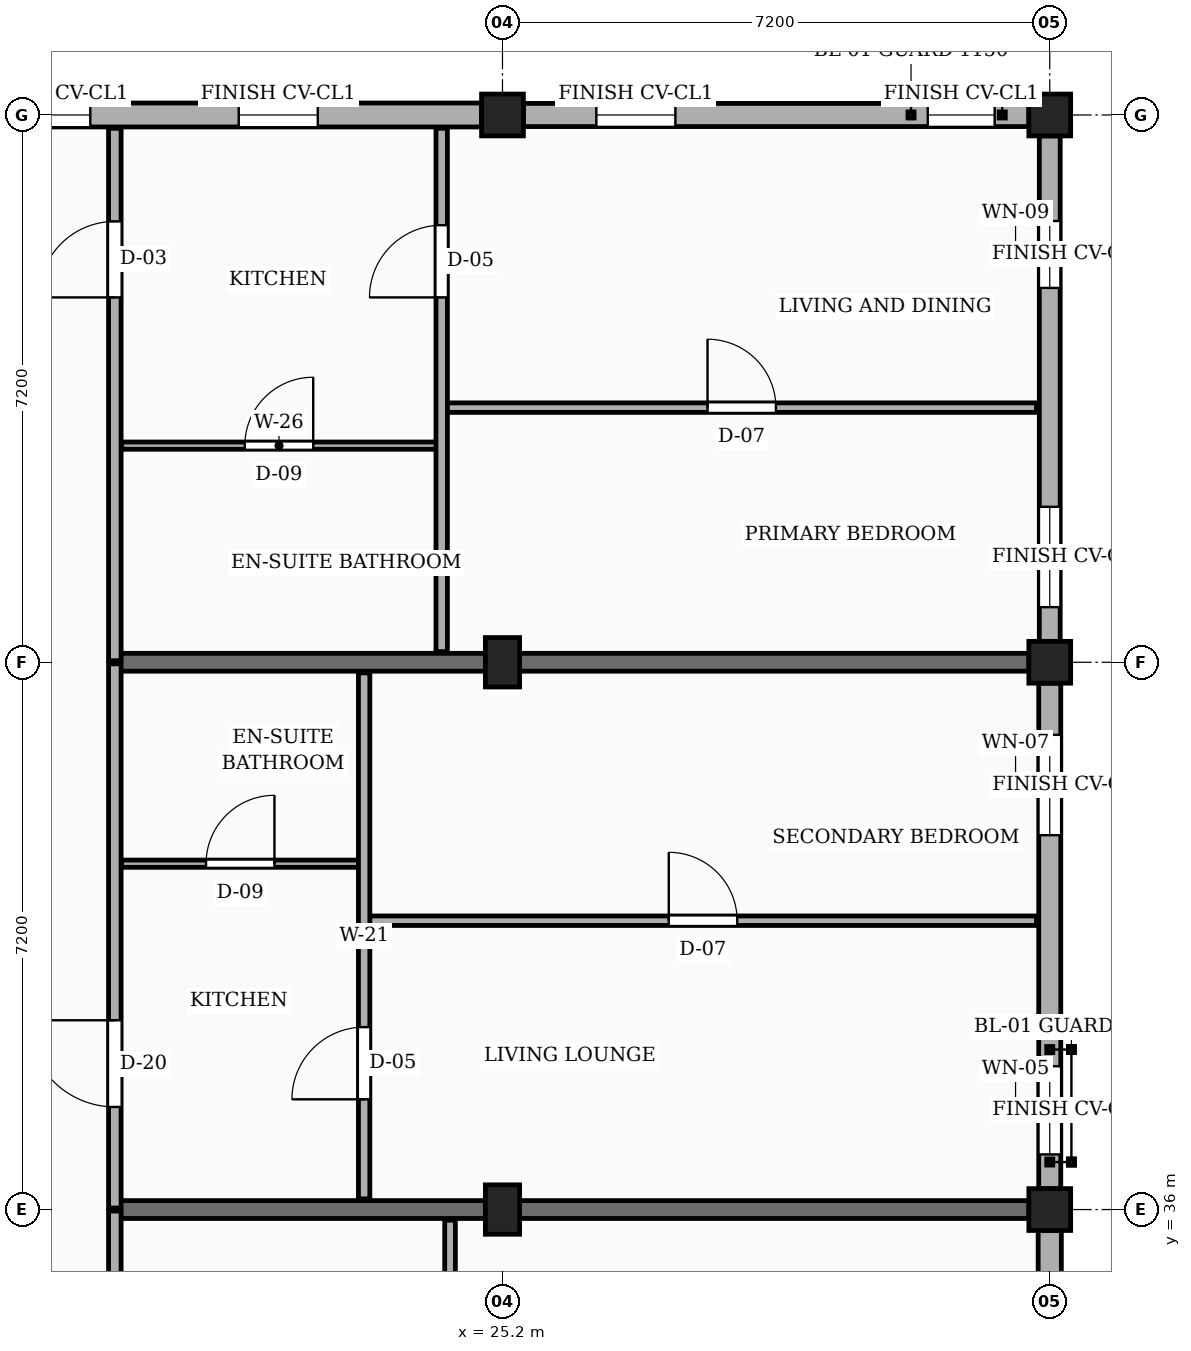
"""IFC4 building model, lengths in metres.
Left out: names, types, materials, properties, quantities, classifications, styles, units other than length and angle.
Written with IfcOpenShell. Run it as: python <this file> out.ifc"""

import sys

from ifc_helpers import new_model, si_unit, direction, frame, frame_2d, origin, origin_2d, place, context, subcontext, project, spatial, rectangle, extrude, element, fill, save


model = new_model("IFC4")
c1 = context("Model", 3, precision=1e-05, world=origin(), true_north=direction((0.0, 1.0)))
c2 = subcontext(c1, "Body", "Model", "MODEL_VIEW")
j1 = project(units=[si_unit("LENGTHUNIT", "METRE"), si_unit("PLANEANGLEUNIT", "RADIAN")], contexts=[c1])
p1 = place(None, origin())
s1 = spatial("IfcSite", under=j1, at=p1, CompositionType="ELEMENT")
p2 = place(p1, origin())
s2 = spatial("IfcBuilding", under=s1, at=p2, CompositionType="ELEMENT")
p3 = place(p2, frame((0.0, 0.0, 20.25)))
s3 = spatial("IfcBuildingStorey", under=s2, at=p3, CompositionType="ELEMENT", Elevation=20.25)
for number, where, z_axis, x_axis in (
    (1, (25.2, 36.0, 0.0), (0.0, 0.0, 1.0), (1.0, 0.0, 0.0)),
    (2, (25.2, 43.2, 0.0), (0.0, 0.0, 1.0), (1.0, 0.0, 0.0)),
):
    element("IfcColumn", number, at=place(p3, frame(where, z_axis=z_axis, x_axis=x_axis)), inside=s3, PredefinedType="COLUMN", context=c2, shape_type="SweptSolid", body=[
        extrude(rectangle(XDim=0.45, YDim=0.65, at=origin_2d()), origin(), (0.0, 0.0, 1.0), 3.15),
    ])
for number, where, z_axis, x_axis in (
    (3, (25.2, 50.4, 0.0), (0.0, 0.0, 1.0), (1.0, 0.0, 0.0)),
    (4, (32.4, 36.0, 0.0), (0.0, 0.0, 1.0), (1.0, 0.0, 0.0)),
    (5, (32.4, 43.2, 0.0), (0.0, 0.0, 1.0), (1.0, 0.0, 0.0)),
    (6, (32.4, 50.4, 0.0), (0.0, 0.0, 1.0), (1.0, 0.0, 0.0)),
):
    element("IfcColumn", number, at=place(p3, frame(where, z_axis=z_axis, x_axis=x_axis)), inside=s3, PredefinedType="COLUMN", context=c2, shape_type="SweptSolid", body=[
        extrude(rectangle(XDim=0.55, YDim=0.55, at=origin_2d()), origin(), (0.0, 0.0, 1.0), 3.15),
    ])
for number, where, z_axis, x_axis in (
    (7, (20.1, 36.0, 0.0), (0.0, 0.0, 1.0), (1.0, 0.0, 0.0)),
    (8, (20.1, 43.2, 0.0), (0.0, 0.0, 1.0), (1.0, 0.0, 0.0)),
):
    element("IfcWall", number, at=place(p3, frame(where, z_axis=z_axis, x_axis=x_axis)), inside=s3, PredefinedType="SOLIDWALL", context=c2, shape_type="SweptSolid", body=[
        extrude(rectangle(XDim=12.025, YDim=0.235, at=frame_2d((6.012, 0.0))), origin(), (0.0, 0.0, 1.0), 2.17),
    ])
p4 = place(p3, frame((32.4, 29.075, 0.0), z_axis=(0.0, 0.0, 1.0), x_axis=(0.0, 1.0, 0.0)))
e9 = element("IfcWall", 9, at=p4, inside=s3, PredefinedType="SOLIDWALL", context=c2, shape_type="SweptSolid", body=[
    extrude(rectangle(XDim=6.65, YDim=0.305, at=frame_2d((3.325, 0.0))), origin(), (0.0, 0.0, 1.0), 2.44),
])
p5 = place(p4, frame((0.45, 0.0, 0.78)))
e10 = element("IfcOpeningElement", 10, at=p5, cuts=e9, PredefinedType="OPENING", context=c2, shape_type="SweptSolid", body=[
    extrude(rectangle(XDim=1.0, YDim=1.15, at=frame_2d((0.5, 0.575))), frame((0.0, 0.163, 0.0), z_axis=(0.0, -1.0, 0.0), x_axis=(1.0, 0.0, 0.0)), (0.0, 0.0, 1.0), 0.325),
])
p6 = place(p4, frame((4.65, 0.0, 0.78)))
e11 = element("IfcOpeningElement", 11, at=p6, cuts=e9, PredefinedType="OPENING", context=c2, shape_type="SweptSolid", body=[
    extrude(rectangle(XDim=1.16, YDim=1.15, at=frame_2d((0.58, 0.575))), frame((0.0, 0.163, 0.0), z_axis=(0.0, -1.0, 0.0), x_axis=(1.0, 0.0, 0.0)), (0.0, 0.0, 1.0), 0.325),
])
p7 = place(p3, frame((32.4, 36.275, 0.0), z_axis=(0.0, 0.0, 1.0), x_axis=(0.0, 1.0, 0.0)))
e12 = element("IfcWall", 12, at=p7, inside=s3, PredefinedType="SOLIDWALL", context=c2, shape_type="SweptSolid", body=[
    extrude(rectangle(XDim=6.65, YDim=0.29, at=frame_2d((3.325, 0.0))), origin(), (0.0, 0.0, 1.0), 2.44),
])
p8 = place(p7, frame((0.45, 0.0, 0.78)))
e13 = element("IfcOpeningElement", 13, at=p8, cuts=e12, PredefinedType="OPENING", context=c2, shape_type="SweptSolid", body=[
    extrude(rectangle(XDim=1.16, YDim=1.15, at=frame_2d((0.58, 0.575))), frame((0.0, 0.155, 0.0), z_axis=(0.0, -1.0, 0.0), x_axis=(1.0, 0.0, 0.0)), (0.0, 0.0, 1.0), 0.31),
])
p9 = place(p7, frame((4.65, 0.0, 0.78)))
e14 = element("IfcOpeningElement", 14, at=p9, cuts=e12, PredefinedType="OPENING", context=c2, shape_type="SweptSolid", body=[
    extrude(rectangle(XDim=1.32, YDim=1.15, at=frame_2d((0.66, 0.575))), frame((0.0, 0.155, 0.0), z_axis=(0.0, -1.0, 0.0), x_axis=(1.0, 0.0, 0.0)), (0.0, 0.0, 1.0), 0.31),
])
p10 = place(p3, frame((32.4, 43.475, 0.0), z_axis=(0.0, 0.0, 1.0), x_axis=(0.0, 1.0, 0.0)))
e15 = element("IfcWall", 15, at=p10, inside=s3, PredefinedType="SOLIDWALL", context=c2, shape_type="SweptSolid", body=[
    extrude(rectangle(XDim=6.65, YDim=0.275, at=frame_2d((3.325, 0.0))), origin(), (0.0, 0.0, 1.0), 2.44),
])
p11 = place(p10, frame((0.45, 0.0, 0.78)))
e16 = element("IfcOpeningElement", 16, at=p11, cuts=e15, PredefinedType="OPENING", context=c2, shape_type="SweptSolid", body=[
    extrude(rectangle(XDim=1.32, YDim=1.15, at=frame_2d((0.66, 0.575))), frame((0.0, 0.147, 0.0), z_axis=(0.0, -1.0, 0.0), x_axis=(1.0, 0.0, 0.0)), (0.0, 0.0, 1.0), 0.295),
])
p12 = place(p10, frame((4.65, 0.0, 0.78)))
e17 = element("IfcOpeningElement", 17, at=p12, cuts=e15, PredefinedType="OPENING", context=c2, shape_type="SweptSolid", body=[
    extrude(rectangle(XDim=0.88, YDim=1.26, at=frame_2d((0.44, 0.63))), frame((0.0, 0.147, 0.0), z_axis=(0.0, -1.0, 0.0), x_axis=(1.0, 0.0, 0.0)), (0.0, 0.0, 1.0), 0.295),
])
p13 = place(p3, frame((32.125, 50.4, 0.0), z_axis=(0.0, 0.0, 1.0), x_axis=(-1.0, 0.0, 0.0)))
e18 = element("IfcWall", 18, at=p13, inside=s3, PredefinedType="SOLIDWALL", context=c2, shape_type="SweptSolid", body=[
    extrude(rectangle(XDim=6.65, YDim=0.305, at=frame_2d((3.325, 0.0))), origin(), (0.0, 0.0, 1.0), 2.44),
])
p14 = place(p13, frame((0.45, 0.0, 0.78)))
e19 = element("IfcOpeningElement", 19, at=p14, cuts=e18, PredefinedType="OPENING", context=c2, shape_type="SweptSolid", body=[
    extrude(rectangle(XDim=0.88, YDim=1.26, at=frame_2d((0.44, 0.63))), frame((0.0, 0.163, 0.0), z_axis=(0.0, -1.0, 0.0), x_axis=(1.0, 0.0, 0.0)), (0.0, 0.0, 1.0), 0.325),
])
p15 = place(p13, frame((4.65, 0.0, 0.78)))
e20 = element("IfcOpeningElement", 20, at=p15, cuts=e18, PredefinedType="OPENING", context=c2, shape_type="SweptSolid", body=[
    extrude(rectangle(XDim=1.04, YDim=1.26, at=frame_2d((0.52, 0.63))), frame((0.0, 0.163, 0.0), z_axis=(0.0, -1.0, 0.0), x_axis=(1.0, 0.0, 0.0)), (0.0, 0.0, 1.0), 0.325),
])
p16 = place(p3, frame((24.925, 50.4, 0.0), z_axis=(0.0, 0.0, 1.0), x_axis=(-1.0, 0.0, 0.0)))
e21 = element("IfcWall", 21, at=p16, inside=s3, PredefinedType="SOLIDWALL", context=c2, shape_type="SweptSolid", body=[
    extrude(rectangle(XDim=6.65, YDim=0.315, at=frame_2d((3.325, 0.0))), origin(), (0.0, 0.0, 1.0), 2.44),
])
p17 = place(p16, frame((2.155, 0.0, 0.78)))
e22 = element("IfcOpeningElement", 22, at=p17, cuts=e21, PredefinedType="OPENING", context=c2, shape_type="SweptSolid", body=[
    extrude(rectangle(XDim=1.04, YDim=1.26, at=frame_2d((0.52, 0.63))), frame((0.0, 0.167, 0.0), z_axis=(0.0, -1.0, 0.0), x_axis=(1.0, 0.0, 0.0)), (0.0, 0.0, 1.0), 0.335),
])
p18 = place(p16, frame((5.147, 0.0, 0.78)))
e23 = element("IfcOpeningElement", 23, at=p18, cuts=e21, PredefinedType="OPENING", context=c2, shape_type="SweptSolid", body=[
    extrude(rectangle(XDim=1.04, YDim=1.26, at=frame_2d((0.52, 0.63))), frame((0.0, 0.167, 0.0), z_axis=(0.0, -1.0, 0.0), x_axis=(1.0, 0.0, 0.0)), (0.0, 0.0, 1.0), 0.335),
])
p19 = place(p3, frame((20.1, 28.82, 0.0), z_axis=(0.0, 0.0, 1.0), x_axis=(0.0, 1.0, 0.0)))
e24 = element("IfcWall", 24, at=p19, inside=s3, PredefinedType="PARTITIONING", context=c2, shape_type="SweptSolid", body=[
    extrude(rectangle(XDim=7.16, YDim=0.165, at=frame_2d((3.58, 0.0))), origin(), (0.0, 0.0, 1.0), 2.305),
])
p20 = place(p19, frame((4.78, 0.0, 0.0)))
e25 = element("IfcOpeningElement", 25, at=p20, cuts=e24, PredefinedType="OPENING", context=c2, shape_type="SweptSolid", body=[
    extrude(rectangle(XDim=0.94, YDim=2.12, at=frame_2d((0.47, 1.06))), frame((0.0, 0.093, 0.0), z_axis=(0.0, -1.0, 0.0), x_axis=(1.0, 0.0, 0.0)), (0.0, 0.0, 1.0), 0.185),
])
p21 = place(p3, frame((20.1, 36.02, 0.0), z_axis=(0.0, 0.0, 1.0), x_axis=(0.0, 1.0, 0.0)))
e26 = element("IfcWall", 26, at=p21, inside=s3, PredefinedType="PARTITIONING", context=c2, shape_type="SweptSolid", body=[
    extrude(rectangle(XDim=7.16, YDim=0.165, at=frame_2d((3.58, 0.0))), origin(), (0.0, 0.0, 1.0), 2.305),
])
p22 = place(p21, frame((1.33, 0.0, 0.0)))
e27 = element("IfcOpeningElement", 27, at=p22, cuts=e26, PredefinedType="OPENING", context=c2, shape_type="SweptSolid", body=[
    extrude(rectangle(XDim=1.14, YDim=2.18, at=frame_2d((0.57, 1.09))), frame((0.0, 0.093, 0.0), z_axis=(0.0, -1.0, 0.0), x_axis=(1.0, 0.0, 0.0)), (0.0, 0.0, 1.0), 0.185),
])
p23 = place(p3, frame((20.1, 43.22, 0.0), z_axis=(0.0, 0.0, 1.0), x_axis=(0.0, 1.0, 0.0)))
e28 = element("IfcWall", 28, at=p23, inside=s3, PredefinedType="PARTITIONING", context=c2, shape_type="SweptSolid", body=[
    extrude(rectangle(XDim=7.005, YDim=0.165, at=frame_2d((3.502, 0.0))), origin(), (0.0, 0.0, 1.0), 2.305),
])
p24 = place(p23, frame((4.78, 0.0, 0.0)))
e29 = element("IfcOpeningElement", 29, at=p24, cuts=e28, PredefinedType="OPENING", context=c2, shape_type="SweptSolid", body=[
    extrude(rectangle(XDim=1.0, YDim=2.15, at=frame_2d((0.5, 1.075))), frame((0.0, 0.093, 0.0), z_axis=(0.0, -1.0, 0.0), x_axis=(1.0, 0.0, 0.0)), (0.0, 0.0, 1.0), 0.185),
])
p25 = place(p3, frame((24.51, 28.94, 0.0), z_axis=(0.0, 0.0, 1.0), x_axis=(0.0, 1.0, 0.0)))
e30 = element("IfcWall", 30, at=p25, inside=s3, PredefinedType="PARTITIONING", context=c2, shape_type="SweptSolid", body=[
    extrude(rectangle(XDim=6.92, YDim=0.14, at=frame_2d((3.46, 0.0))), origin(), (0.0, 0.0, 1.0), 2.305),
])
p26 = place(p25, frame((4.66, 0.0, 0.0)))
e31 = element("IfcOpeningElement", 31, at=p26, cuts=e30, PredefinedType="OPENING", context=c2, shape_type="SweptSolid", body=[
    extrude(rectangle(XDim=0.92, YDim=2.1, at=frame_2d((0.46, 1.05))), frame((0.0, 0.08, 0.0), z_axis=(0.0, -1.0, 0.0), x_axis=(1.0, 0.0, 0.0)), (0.0, 0.0, 1.0), 0.16),
])
p27 = place(p3, frame((23.45, 39.8, 0.0), z_axis=(0.0, 0.0, 1.0), x_axis=(1.0, 0.0, 0.0)))
e32 = element("IfcWall", 32, at=p27, inside=s3, PredefinedType="PARTITIONING", context=c2, shape_type="SweptSolid", body=[
    extrude(rectangle(XDim=8.775, YDim=0.125, at=frame_2d((4.388, 0.0))), origin(), (0.0, 0.0, 1.0), 2.305),
])
p28 = place(p27, frame((3.938, 0.0, 0.0)))
e33 = element("IfcOpeningElement", 33, at=p28, cuts=e32, PredefinedType="OPENING", context=c2, shape_type="SweptSolid", body=[
    extrude(rectangle(XDim=0.9, YDim=2.1, at=frame_2d((0.45, 1.05))), frame((0.0, 0.073, 0.0), z_axis=(0.0, -1.0, 0.0), x_axis=(1.0, 0.0, 0.0)), (0.0, 0.0, 1.0), 0.145),
])
p29 = place(p3, frame((20.19, 40.55, 0.0), z_axis=(0.0, 0.0, 1.0), x_axis=(1.0, 0.0, 0.0)))
e34 = element("IfcWall", 34, at=p29, inside=s3, PredefinedType="PARTITIONING", context=c2, shape_type="SweptSolid", body=[
    extrude(rectangle(XDim=3.12, YDim=0.095, at=frame_2d((1.56, 0.0))), origin(), (0.0, 0.0, 1.0), 2.305),
])
p30 = place(p29, frame((1.11, 0.0, 0.0)))
e35 = element("IfcOpeningElement", 35, at=p30, cuts=e34, PredefinedType="OPENING", context=c2, shape_type="SweptSolid", body=[
    extrude(rectangle(XDim=0.9, YDim=2.05, at=frame_2d((0.45, 1.025))), frame((0.0, 0.058, 0.0), z_axis=(0.0, -1.0, 0.0), x_axis=(1.0, 0.0, 0.0)), (0.0, 0.0, 1.0), 0.115),
])
p31 = place(p3, frame((23.38, 36.14, 0.0), z_axis=(0.0, 0.0, 1.0), x_axis=(0.0, 1.0, 0.0)))
e36 = element("IfcWall", 36, at=p31, inside=s3, PredefinedType="PARTITIONING", context=c2, shape_type="SweptSolid", body=[
    extrude(rectangle(XDim=6.92, YDim=0.15, at=frame_2d((3.46, 0.0))), origin(), (0.0, 0.0, 1.0), 2.305),
])
p32 = place(p31, frame((1.31, 0.0, 0.0)))
e37 = element("IfcOpeningElement", 37, at=p32, cuts=e36, PredefinedType="OPENING", context=c2, shape_type="SweptSolid", body=[
    extrude(rectangle(XDim=0.95, YDim=2.1, at=frame_2d((0.475, 1.05))), frame((0.0, 0.085, 0.0), z_axis=(0.0, -1.0, 0.0), x_axis=(1.0, 0.0, 0.0)), (0.0, 0.0, 1.0), 0.17),
])
p33 = place(p3, frame((24.47, 46.55, 0.0), z_axis=(0.0, 0.0, 1.0), x_axis=(1.0, 0.0, 0.0)))
e38 = element("IfcWall", 38, at=p33, inside=s3, PredefinedType="PARTITIONING", context=c2, shape_type="SweptSolid", body=[
    extrude(rectangle(XDim=7.755, YDim=0.125, at=frame_2d((3.877, 0.0))), origin(), (0.0, 0.0, 1.0), 2.305),
])
p34 = place(p33, frame((3.427, 0.0, 0.0)))
e39 = element("IfcOpeningElement", 39, at=p34, cuts=e38, PredefinedType="OPENING", context=c2, shape_type="SweptSolid", body=[
    extrude(rectangle(XDim=0.9, YDim=2.1, at=frame_2d((0.45, 1.05))), frame((0.0, 0.073, 0.0), z_axis=(0.0, -1.0, 0.0), x_axis=(1.0, 0.0, 0.0)), (0.0, 0.0, 1.0), 0.145),
])
p35 = place(p3, frame((20.19, 46.05, 0.0), z_axis=(0.0, 0.0, 1.0), x_axis=(1.0, 0.0, 0.0)))
e40 = element("IfcWall", 40, at=p35, inside=s3, PredefinedType="PARTITIONING", context=c2, shape_type="SweptSolid", body=[
    extrude(rectangle(XDim=4.14, YDim=0.095, at=frame_2d((2.07, 0.0))), origin(), (0.0, 0.0, 1.0), 2.305),
])
p36 = place(p35, frame((1.62, 0.0, 0.0)))
e41 = element("IfcOpeningElement", 41, at=p36, cuts=e40, PredefinedType="OPENING", context=c2, shape_type="SweptSolid", body=[
    extrude(rectangle(XDim=0.9, YDim=2.05, at=frame_2d((0.45, 1.025))), frame((0.0, 0.058, 0.0), z_axis=(0.0, -1.0, 0.0), x_axis=(1.0, 0.0, 0.0)), (0.0, 0.0, 1.0), 0.115),
])
p37 = place(p3, frame((24.4, 43.34, 0.0), z_axis=(0.0, 0.0, 1.0), x_axis=(0.0, 1.0, 0.0)))
e42 = element("IfcWall", 42, at=p37, inside=s3, PredefinedType="PARTITIONING", context=c2, shape_type="SweptSolid", body=[
    extrude(rectangle(XDim=6.885, YDim=0.15, at=frame_2d((3.442, 0.0))), origin(), (0.0, 0.0, 1.0), 2.305),
])
p38 = place(p37, frame((4.66, 0.0, 0.0)))
e43 = element("IfcOpeningElement", 43, at=p38, cuts=e42, PredefinedType="OPENING", context=c2, shape_type="SweptSolid", body=[
    extrude(rectangle(XDim=0.95, YDim=2.1, at=frame_2d((0.475, 1.05))), frame((0.0, 0.085, 0.0), z_axis=(0.0, -1.0, 0.0), x_axis=(1.0, 0.0, 0.0)), (0.0, 0.0, 1.0), 0.17),
])
p39 = place(p8, origin())
e44 = element("IfcWindow", 44, at=p39, inside=s3, PartitioningType="SINGLE_PANEL", PredefinedType="WINDOW", context=c2, shape_type="SweptSolid", body=[
    extrude(rectangle(XDim=1.16, YDim=1.15, at=frame_2d((0.58, 0.575))), frame((0.0, 0.03, 0.0), z_axis=(0.0, -1.0, 0.0), x_axis=(1.0, 0.0, 0.0)), (0.0, 0.0, 1.0), 0.06),
])
fill(e13, e44)
p40 = place(p9, origin())
e45 = element("IfcWindow", 45, at=p40, inside=s3, PartitioningType="SINGLE_PANEL", PredefinedType="WINDOW", context=c2, shape_type="SweptSolid", body=[
    extrude(rectangle(XDim=1.32, YDim=1.15, at=frame_2d((0.66, 0.575))), frame((0.0, 0.03, 0.0), z_axis=(0.0, -1.0, 0.0), x_axis=(1.0, 0.0, 0.0)), (0.0, 0.0, 1.0), 0.06),
])
fill(e14, e45)
p41 = place(p11, origin())
e46 = element("IfcWindow", 46, at=p41, inside=s3, PartitioningType="SINGLE_PANEL", PredefinedType="WINDOW", context=c2, shape_type="SweptSolid", body=[
    extrude(rectangle(XDim=1.32, YDim=1.15, at=frame_2d((0.66, 0.575))), frame((0.0, 0.03, 0.0), z_axis=(0.0, -1.0, 0.0), x_axis=(1.0, 0.0, 0.0)), (0.0, 0.0, 1.0), 0.06),
])
fill(e16, e46)
p42 = place(p12, origin())
e47 = element("IfcWindow", 47, at=p42, inside=s3, PartitioningType="SINGLE_PANEL", PredefinedType="WINDOW", context=c2, shape_type="SweptSolid", body=[
    extrude(rectangle(XDim=0.88, YDim=1.26, at=frame_2d((0.44, 0.63))), frame((0.0, 0.03, 0.0), z_axis=(0.0, -1.0, 0.0), x_axis=(1.0, 0.0, 0.0)), (0.0, 0.0, 1.0), 0.06),
])
fill(e17, e47)
p43 = place(p14, origin())
e48 = element("IfcWindow", 48, at=p43, inside=s3, PartitioningType="SINGLE_PANEL", PredefinedType="WINDOW", context=c2, shape_type="SweptSolid", body=[
    extrude(rectangle(XDim=0.88, YDim=1.26, at=frame_2d((0.44, 0.63))), frame((0.0, 0.03, 0.0), z_axis=(0.0, -1.0, 0.0), x_axis=(1.0, 0.0, 0.0)), (0.0, 0.0, 1.0), 0.06),
])
fill(e19, e48)
p44 = place(p15, origin())
e49 = element("IfcWindow", 49, at=p44, inside=s3, PartitioningType="SINGLE_PANEL", PredefinedType="WINDOW", context=c2, shape_type="SweptSolid", body=[
    extrude(rectangle(XDim=1.04, YDim=1.26, at=frame_2d((0.52, 0.63))), frame((0.0, 0.03, 0.0), z_axis=(0.0, -1.0, 0.0), x_axis=(1.0, 0.0, 0.0)), (0.0, 0.0, 1.0), 0.06),
])
fill(e20, e49)
p45 = place(p17, origin())
e50 = element("IfcWindow", 50, at=p45, inside=s3, PartitioningType="SINGLE_PANEL", PredefinedType="WINDOW", context=c2, shape_type="SweptSolid", body=[
    extrude(rectangle(XDim=1.04, YDim=1.26, at=frame_2d((0.52, 0.63))), frame((0.0, 0.03, 0.0), z_axis=(0.0, -1.0, 0.0), x_axis=(1.0, 0.0, 0.0)), (0.0, 0.0, 1.0), 0.06),
])
fill(e22, e50)
p46 = place(p18, origin())
e51 = element("IfcWindow", 51, at=p46, inside=s3, PartitioningType="SINGLE_PANEL", PredefinedType="WINDOW", context=c2, shape_type="SweptSolid", body=[
    extrude(rectangle(XDim=1.04, YDim=1.26, at=frame_2d((0.52, 0.63))), frame((0.0, 0.03, 0.0), z_axis=(0.0, -1.0, 0.0), x_axis=(1.0, 0.0, 0.0)), (0.0, 0.0, 1.0), 0.06),
])
fill(e23, e51)
p47 = place(p22, origin())
e52 = element("IfcDoor", 52, at=p47, inside=s3, OperationType="SINGLE_SWING_RIGHT", PredefinedType="DOOR", context=c2, shape_type="SweptSolid", body=[
    extrude(rectangle(XDim=1.14, YDim=2.18, at=frame_2d((0.57, 1.09))), frame((0.0, 0.025, 0.0), z_axis=(0.0, -1.0, 0.0), x_axis=(1.0, 0.0, 0.0)), (0.0, 0.0, 1.0), 0.05),
])
fill(e27, e52)
p48 = place(p24, origin())
e53 = element("IfcDoor", 53, at=p48, inside=s3, OperationType="SINGLE_SWING_LEFT", PredefinedType="DOOR", context=c2, shape_type="SweptSolid", body=[
    extrude(rectangle(XDim=1.0, YDim=2.15, at=frame_2d((0.5, 1.075))), frame((0.0, 0.025, 0.0), z_axis=(0.0, -1.0, 0.0), x_axis=(1.0, 0.0, 0.0)), (0.0, 0.0, 1.0), 0.05),
])
fill(e29, e53)
p49 = place(p28, origin())
e54 = element("IfcDoor", 54, at=p49, inside=s3, OperationType="SINGLE_SWING_LEFT", PredefinedType="DOOR", context=c2, shape_type="SweptSolid", body=[
    extrude(rectangle(XDim=0.9, YDim=2.1, at=frame_2d((0.45, 1.05))), frame((0.0, 0.025, 0.0), z_axis=(0.0, -1.0, 0.0), x_axis=(1.0, 0.0, 0.0)), (0.0, 0.0, 1.0), 0.05),
])
fill(e33, e54)
p50 = place(p30, origin())
e55 = element("IfcDoor", 55, at=p50, inside=s3, OperationType="SINGLE_SWING_RIGHT", PredefinedType="DOOR", context=c2, shape_type="SweptSolid", body=[
    extrude(rectangle(XDim=0.9, YDim=2.05, at=frame_2d((0.45, 1.025))), frame((0.0, 0.025, 0.0), z_axis=(0.0, -1.0, 0.0), x_axis=(1.0, 0.0, 0.0)), (0.0, 0.0, 1.0), 0.05),
])
fill(e35, e55)
p51 = place(p32, origin())
e56 = element("IfcDoor", 56, at=p51, inside=s3, OperationType="SINGLE_SWING_LEFT", PredefinedType="DOOR", context=c2, shape_type="SweptSolid", body=[
    extrude(rectangle(XDim=0.95, YDim=2.1, at=frame_2d((0.475, 1.05))), frame((0.0, 0.025, 0.0), z_axis=(0.0, -1.0, 0.0), x_axis=(1.0, 0.0, 0.0)), (0.0, 0.0, 1.0), 0.05),
])
fill(e37, e56)
p52 = place(p34, origin())
e57 = element("IfcDoor", 57, at=p52, inside=s3, OperationType="SINGLE_SWING_LEFT", PredefinedType="DOOR", context=c2, shape_type="SweptSolid", body=[
    extrude(rectangle(XDim=0.9, YDim=2.1, at=frame_2d((0.45, 1.05))), frame((0.0, 0.025, 0.0), z_axis=(0.0, -1.0, 0.0), x_axis=(1.0, 0.0, 0.0)), (0.0, 0.0, 1.0), 0.05),
])
fill(e39, e57)
p53 = place(p36, origin())
e58 = element("IfcDoor", 58, at=p53, inside=s3, OperationType="SINGLE_SWING_RIGHT", PredefinedType="DOOR", context=c2, shape_type="SweptSolid", body=[
    extrude(rectangle(XDim=0.9, YDim=2.05, at=frame_2d((0.45, 1.025))), frame((0.0, 0.025, 0.0), z_axis=(0.0, -1.0, 0.0), x_axis=(1.0, 0.0, 0.0)), (0.0, 0.0, 1.0), 0.05),
])
fill(e41, e58)
p54 = place(p38, origin())
e59 = element("IfcDoor", 59, at=p54, inside=s3, OperationType="SINGLE_SWING_LEFT", PredefinedType="DOOR", context=c2, shape_type="SweptSolid", body=[
    extrude(rectangle(XDim=0.95, YDim=2.1, at=frame_2d((0.475, 1.05))), frame((0.0, 0.025, 0.0), z_axis=(0.0, -1.0, 0.0), x_axis=(1.0, 0.0, 0.0)), (0.0, 0.0, 1.0), 0.05),
])
fill(e43, e59)
save(model, sys.argv[1])
